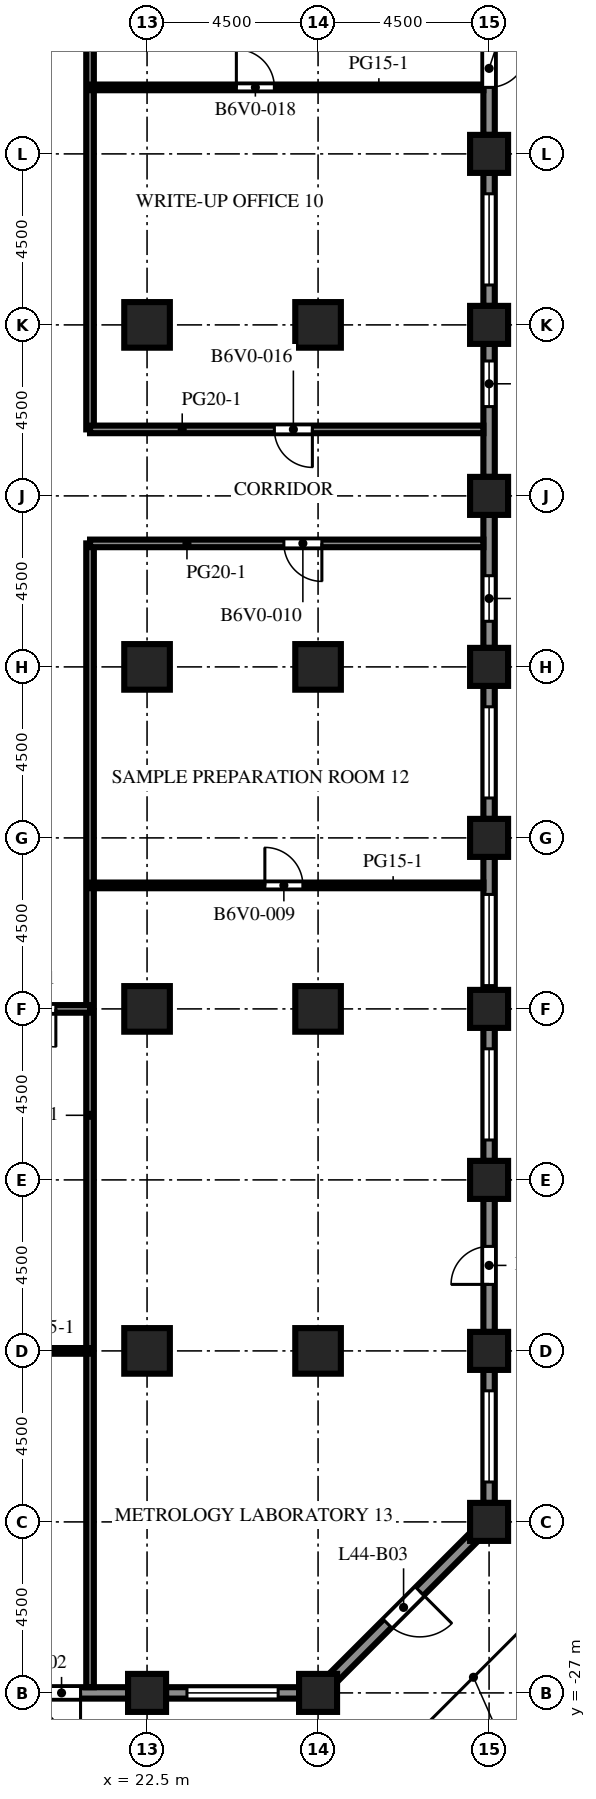
"""IFC4 building model, lengths in metres.
Left out: names, types, materials, properties, quantities, classifications, styles, units other than length and angle.
Written with IfcOpenShell. Run it as: python <this file> out.ifc"""

import sys

from ifc_helpers import new_model, si_unit, direction, frame, frame_2d, origin, origin_2d, place, context, subcontext, project, spatial, rectangle, extrude, element, fill, save


model = new_model("IFC4")
c1 = context("Model", 3, precision=1e-05, world=origin(), true_north=direction((0.0, 1.0)))
c2 = subcontext(c1, "Body", "Model", "MODEL_VIEW")
j1 = project(units=[si_unit("LENGTHUNIT", "METRE"), si_unit("PLANEANGLEUNIT", "RADIAN")], contexts=[c1])
p1 = place(None, origin())
s1 = spatial("IfcSite", under=j1, at=p1, CompositionType="ELEMENT")
p2 = place(p1, origin())
s2 = spatial("IfcBuilding", under=s1, at=p2, CompositionType="ELEMENT")
p3 = place(p2, frame((0.0, 0.0, 195.6)))
s3 = spatial("IfcBuildingStorey", under=s2, at=p3, CompositionType="ELEMENT", Elevation=195.6)
for number, where, z_axis, x_axis in (
    (1, (22.5, -27.0, 0.0), (0.0, 0.0, 1.0), (1.0, 0.0, 0.0)),
    (2, (27.0, -27.0, 0.0), (0.0, 0.0, 1.0), (1.0, 0.0, 0.0)),
    (3, (31.5, -22.5, 0.0), (0.0, 0.0, 1.0), (1.0, 0.0, 0.0)),
    (4, (31.5, -18.0, 0.0), (0.0, 0.0, 1.0), (1.0, 0.0, 0.0)),
    (5, (31.5, -13.5, 0.0), (0.0, 0.0, 1.0), (1.0, 0.0, 0.0)),
    (6, (31.5, -9.0, 0.0), (0.0, 0.0, 1.0), (1.0, 0.0, 0.0)),
    (7, (31.5, -4.5, 0.0), (0.0, 0.0, 1.0), (1.0, 0.0, 0.0)),
    (8, (31.5, 0.0, 0.0), (0.0, 0.0, 1.0), (1.0, 0.0, 0.0)),
    (9, (31.5, 4.5, 0.0), (0.0, 0.0, 1.0), (1.0, 0.0, 0.0)),
    (10, (31.5, 9.0, 0.0), (0.0, 0.0, 1.0), (1.0, 0.0, 0.0)),
    (11, (31.5, 13.5, 0.0), (0.0, 0.0, 1.0), (1.0, 0.0, 0.0)),
):
    element("IfcColumn", number, at=place(p3, frame(where, z_axis=z_axis, x_axis=x_axis)), inside=s3, PredefinedType="COLUMN", context=c2, shape_type="SweptSolid", body=[
        extrude(rectangle(XDim=1.0, YDim=1.0, at=origin_2d()), origin(), (0.0, 0.0, 1.0), 4.1),
    ])
for number, where, z_axis, x_axis in (
    (12, (22.5, -18.0, 0.0), (0.0, 0.0, 1.0), (1.0, 0.0, 0.0)),
    (13, (22.5, -9.0, 0.0), (0.0, 0.0, 1.0), (1.0, 0.0, 0.0)),
    (14, (22.5, 0.0, 0.0), (0.0, 0.0, 1.0), (1.0, 0.0, 0.0)),
    (15, (22.5, 9.0, 0.0), (0.0, 0.0, 1.0), (1.0, 0.0, 0.0)),
    (16, (27.0, -18.0, 0.0), (0.0, 0.0, 1.0), (1.0, 0.0, 0.0)),
    (17, (27.0, -9.0, 0.0), (0.0, 0.0, 1.0), (1.0, 0.0, 0.0)),
    (18, (27.0, 0.0, 0.0), (0.0, 0.0, 1.0), (1.0, 0.0, 0.0)),
    (19, (27.0, 9.0, 0.0), (0.0, 0.0, 1.0), (1.0, 0.0, 0.0)),
):
    element("IfcColumn", number, at=place(p3, frame(where, z_axis=z_axis, x_axis=x_axis)), inside=s3, PredefinedType="COLUMN", context=c2, shape_type="SweptSolid", body=[
        extrude(rectangle(XDim=1.2, YDim=1.2, at=origin_2d()), origin(), (0.0, 0.0, 1.0), 4.1),
    ])
p4 = place(p3, frame((22.0, -27.0, 0.0), z_axis=(0.0, 0.0, 1.0), x_axis=(-1.0, 0.0, 0.0)))
e20 = element("IfcWall", 20, at=p4, inside=s3, PredefinedType="SOLIDWALL", context=c2, shape_type="SweptSolid", body=[
    extrude(rectangle(XDim=3.5, YDim=0.3, at=frame_2d((1.75, 0.0))), origin(), (0.0, 0.0, 1.0), 2.85),
])
p5 = place(p4, frame((1.25, 0.0, 0.0)))
e21 = element("IfcOpeningElement", 21, at=p5, cuts=e20, PredefinedType="OPENING", context=c2, shape_type="SweptSolid", body=[
    extrude(rectangle(XDim=1.0, YDim=2.2, at=frame_2d((0.5, 1.1))), frame((0.0, 0.16, 0.0), z_axis=(0.0, -1.0, 0.0), x_axis=(1.0, 0.0, 0.0)), (0.0, 0.0, 1.0), 0.32),
])
p6 = place(p3, frame((26.5, -27.0, 0.0), z_axis=(0.0, 0.0, 1.0), x_axis=(-1.0, 0.0, 0.0)))
e22 = element("IfcWall", 22, at=p6, inside=s3, PredefinedType="SOLIDWALL", context=c2, shape_type="SweptSolid", body=[
    extrude(rectangle(XDim=3.5, YDim=0.3, at=frame_2d((1.75, 0.0))), origin(), (0.0, 0.0, 1.0), 2.85),
])
p7 = place(p6, frame((0.55, 0.0, 0.8)))
e23 = element("IfcOpeningElement", 23, at=p7, cuts=e22, PredefinedType="OPENING", context=c2, shape_type="SweptSolid", body=[
    extrude(rectangle(XDim=2.4, YDim=1.7, at=frame_2d((1.2, 0.85))), frame((0.0, 0.16, 0.0), z_axis=(0.0, -1.0, 0.0), x_axis=(1.0, 0.0, 0.0)), (0.0, 0.0, 1.0), 0.32),
])
p8 = place(p3, frame((31.106, -22.894, 0.0), z_axis=(0.0, 0.0, 1.0), x_axis=(-0.707106781187, -0.707106781187, 0.0)))
e24 = element("IfcWall", 24, at=p8, inside=s3, PredefinedType="SOLIDWALL", context=c2, shape_type="SweptSolid", body=[
    extrude(rectangle(XDim=5.25, YDim=0.3, at=frame_2d((2.625, 0.0))), origin(), (0.0, 0.0, 1.0), 2.85),
])
p9 = place(p8, frame((2.025, 0.0, 0.0)))
e25 = element("IfcOpeningElement", 25, at=p9, cuts=e24, PredefinedType="OPENING", context=c2, shape_type="SweptSolid", body=[
    extrude(rectangle(XDim=1.2, YDim=2.2, at=frame_2d((0.6, 1.1))), frame((0.0, 0.16, 0.0), z_axis=(0.0, -1.0, 0.0), x_axis=(1.0, 0.0, 0.0)), (0.0, 0.0, 1.0), 0.32),
])
p10 = place(p3, frame((31.5, -18.5, 0.0), z_axis=(0.0, 0.0, 1.0), x_axis=(0.0, -1.0, 0.0)))
e26 = element("IfcWall", 26, at=p10, inside=s3, PredefinedType="SOLIDWALL", context=c2, shape_type="SweptSolid", body=[
    extrude(rectangle(XDim=3.5, YDim=0.3, at=frame_2d((1.75, 0.0))), origin(), (0.0, 0.0, 1.0), 2.85),
])
p11 = place(p10, frame((0.55, 0.0, 0.8)))
e27 = element("IfcOpeningElement", 27, at=p11, cuts=e26, PredefinedType="OPENING", context=c2, shape_type="SweptSolid", body=[
    extrude(rectangle(XDim=2.4, YDim=1.7, at=frame_2d((1.2, 0.85))), frame((0.0, 0.16, 0.0), z_axis=(0.0, -1.0, 0.0), x_axis=(1.0, 0.0, 0.0)), (0.0, 0.0, 1.0), 0.32),
])
p12 = place(p3, frame((31.5, -14.0, 0.0), z_axis=(0.0, 0.0, 1.0), x_axis=(0.0, -1.0, 0.0)))
e28 = element("IfcWall", 28, at=p12, inside=s3, PredefinedType="SOLIDWALL", context=c2, shape_type="SweptSolid", body=[
    extrude(rectangle(XDim=3.5, YDim=0.3, at=frame_2d((1.75, 0.0))), origin(), (0.0, 0.0, 1.0), 2.85),
])
p13 = place(p12, frame((1.25, 0.0, 0.0)))
e29 = element("IfcOpeningElement", 29, at=p13, cuts=e28, PredefinedType="OPENING", context=c2, shape_type="SweptSolid", body=[
    extrude(rectangle(XDim=1.0, YDim=2.2, at=frame_2d((0.5, 1.1))), frame((0.0, 0.16, 0.0), z_axis=(0.0, -1.0, 0.0), x_axis=(1.0, 0.0, 0.0)), (0.0, 0.0, 1.0), 0.32),
])
p14 = place(p3, frame((31.5, -9.5, 0.0), z_axis=(0.0, 0.0, 1.0), x_axis=(0.0, -1.0, 0.0)))
e30 = element("IfcWall", 30, at=p14, inside=s3, PredefinedType="SOLIDWALL", context=c2, shape_type="SweptSolid", body=[
    extrude(rectangle(XDim=3.5, YDim=0.3, at=frame_2d((1.75, 0.0))), origin(), (0.0, 0.0, 1.0), 2.85),
])
p15 = place(p14, frame((0.55, 0.0, 0.8)))
e31 = element("IfcOpeningElement", 31, at=p15, cuts=e30, PredefinedType="OPENING", context=c2, shape_type="SweptSolid", body=[
    extrude(rectangle(XDim=2.4, YDim=1.7, at=frame_2d((1.2, 0.85))), frame((0.0, 0.16, 0.0), z_axis=(0.0, -1.0, 0.0), x_axis=(1.0, 0.0, 0.0)), (0.0, 0.0, 1.0), 0.32),
])
p16 = place(p3, frame((31.5, -5.0, 0.0), z_axis=(0.0, 0.0, 1.0), x_axis=(0.0, -1.0, 0.0)))
e32 = element("IfcWall", 32, at=p16, inside=s3, PredefinedType="SOLIDWALL", context=c2, shape_type="SweptSolid", body=[
    extrude(rectangle(XDim=3.5, YDim=0.3, at=frame_2d((1.75, 0.0))), origin(), (0.0, 0.0, 1.0), 2.85),
])
p17 = place(p16, frame((0.988, 0.0, 0.8)))
e33 = element("IfcOpeningElement", 33, at=p17, cuts=e32, PredefinedType="OPENING", context=c2, shape_type="SweptSolid", body=[
    extrude(rectangle(XDim=2.4, YDim=1.7, at=frame_2d((1.2, 0.85))), frame((0.0, 0.16, 0.0), z_axis=(0.0, -1.0, 0.0), x_axis=(1.0, 0.0, 0.0)), (0.0, 0.0, 1.0), 0.32),
])
p18 = place(p3, frame((31.5, -0.5, 0.0), z_axis=(0.0, 0.0, 1.0), x_axis=(0.0, -1.0, 0.0)))
e34 = element("IfcWall", 34, at=p18, inside=s3, PredefinedType="SOLIDWALL", context=c2, shape_type="SweptSolid", body=[
    extrude(rectangle(XDim=3.5, YDim=0.3, at=frame_2d((1.75, 0.0))), origin(), (0.0, 0.0, 1.0), 2.85),
])
p19 = place(p18, frame((0.55, 0.0, 0.8)))
e35 = element("IfcOpeningElement", 35, at=p19, cuts=e34, PredefinedType="OPENING", context=c2, shape_type="SweptSolid", body=[
    extrude(rectangle(XDim=2.4, YDim=1.7, at=frame_2d((1.2, 0.85))), frame((0.0, 0.16, 0.0), z_axis=(0.0, -1.0, 0.0), x_axis=(1.0, 0.0, 0.0)), (0.0, 0.0, 1.0), 0.32),
])
p20 = place(p3, frame((31.5, 4.0, 0.0), z_axis=(0.0, 0.0, 1.0), x_axis=(0.0, -1.0, 0.0)))
e36 = element("IfcWall", 36, at=p20, inside=s3, PredefinedType="SOLIDWALL", context=c2, shape_type="SweptSolid", body=[
    extrude(rectangle(XDim=3.5, YDim=0.3, at=frame_2d((1.75, 0.0))), origin(), (0.0, 0.0, 1.0), 2.85),
])
p21 = place(p20, frame((1.6, 0.0, 0.8)))
e37 = element("IfcOpeningElement", 37, at=p21, cuts=e36, PredefinedType="OPENING", context=c2, shape_type="SweptSolid", body=[
    extrude(rectangle(XDim=1.2, YDim=1.7, at=frame_2d((0.6, 0.85))), frame((0.0, 0.16, 0.0), z_axis=(0.0, -1.0, 0.0), x_axis=(1.0, 0.0, 0.0)), (0.0, 0.0, 1.0), 0.32),
])
p22 = place(p3, frame((31.5, 8.5, 0.0), z_axis=(0.0, 0.0, 1.0), x_axis=(0.0, -1.0, 0.0)))
e38 = element("IfcWall", 38, at=p22, inside=s3, PredefinedType="SOLIDWALL", context=c2, shape_type="SweptSolid", body=[
    extrude(rectangle(XDim=3.5, YDim=0.3, at=frame_2d((1.75, 0.0))), origin(), (0.0, 0.0, 1.0), 2.85),
])
p23 = place(p22, frame((0.45, 0.0, 0.8)))
e39 = element("IfcOpeningElement", 39, at=p23, cuts=e38, PredefinedType="OPENING", context=c2, shape_type="SweptSolid", body=[
    extrude(rectangle(XDim=1.2, YDim=1.7, at=frame_2d((0.6, 0.85))), frame((0.0, 0.16, 0.0), z_axis=(0.0, -1.0, 0.0), x_axis=(1.0, 0.0, 0.0)), (0.0, 0.0, 1.0), 0.32),
])
p24 = place(p3, frame((31.5, 13.0, 0.0), z_axis=(0.0, 0.0, 1.0), x_axis=(0.0, -1.0, 0.0)))
e40 = element("IfcWall", 40, at=p24, inside=s3, PredefinedType="SOLIDWALL", context=c2, shape_type="SweptSolid", body=[
    extrude(rectangle(XDim=3.5, YDim=0.3, at=frame_2d((1.75, 0.0))), origin(), (0.0, 0.0, 1.0), 2.85),
])
p25 = place(p24, frame((0.55, 0.0, 0.8)))
e41 = element("IfcOpeningElement", 41, at=p25, cuts=e40, PredefinedType="OPENING", context=c2, shape_type="SweptSolid", body=[
    extrude(rectangle(XDim=2.4, YDim=1.7, at=frame_2d((1.2, 0.85))), frame((0.0, 0.16, 0.0), z_axis=(0.0, -1.0, 0.0), x_axis=(1.0, 0.0, 0.0)), (0.0, 0.0, 1.0), 0.32),
])
p26 = place(p3, frame((31.5, 17.5, 0.0), z_axis=(0.0, 0.0, 1.0), x_axis=(0.0, -1.0, 0.0)))
e42 = element("IfcWall", 42, at=p26, inside=s3, PredefinedType="SOLIDWALL", context=c2, shape_type="SweptSolid", body=[
    extrude(rectangle(XDim=3.5, YDim=0.3, at=frame_2d((1.75, 0.0))), origin(), (0.0, 0.0, 1.0), 2.85),
])
p27 = place(p26, frame((1.25, 0.0, 0.0)))
e43 = element("IfcOpeningElement", 43, at=p27, cuts=e42, PredefinedType="OPENING", context=c2, shape_type="SweptSolid", body=[
    extrude(rectangle(XDim=1.0, YDim=2.2, at=frame_2d((0.5, 1.1))), frame((0.0, 0.16, 0.0), z_axis=(0.0, -1.0, 0.0), x_axis=(1.0, 0.0, 0.0)), (0.0, 0.0, 1.0), 0.32),
])
p28 = place(p3, frame((21.0, -26.85, 0.0), z_axis=(0.0, 0.0, 1.0), x_axis=(0.0, 1.0, 0.0)))
e44 = element("IfcWall", 44, at=p28, inside=s3, PredefinedType="PARTITIONING", context=c2, shape_type="SweptSolid", body=[
    extrude(rectangle(XDim=30.1, YDim=0.2, at=frame_2d((15.05, 0.0))), origin(), (0.0, 0.0, 1.0), 3.65),
])
p29 = place(p3, frame((21.0, 6.25, 0.0), z_axis=(0.0, 0.0, 1.0), x_axis=(0.0, 1.0, 0.0)))
e45 = element("IfcWall", 45, at=p29, inside=s3, PredefinedType="PARTITIONING", context=c2, shape_type="SweptSolid", body=[
    extrude(rectangle(XDim=20.6, YDim=0.2, at=frame_2d((10.3, 0.0))), origin(), (0.0, 0.0, 1.0), 3.65),
])
p30 = place(p3, frame((18.6, -18.0, 0.0), z_axis=(0.0, 0.0, 1.0), x_axis=(1.0, 0.0, 0.0)))
e46 = element("IfcWall", 46, at=p30, inside=s3, PredefinedType="PARTITIONING", context=c2, shape_type="SweptSolid", body=[
    extrude(rectangle(XDim=2.4, YDim=0.15, at=frame_2d((1.2, 0.0))), origin(), (0.0, 0.0, 1.0), 3.65),
])
p31 = place(p3, frame((21.0, -9.0, 0.0), z_axis=(0.0, 0.0, 1.0), x_axis=(-1.0, 0.0, 0.0)))
e47 = element("IfcWall", 47, at=p31, inside=s3, PredefinedType="PARTITIONING", context=c2, shape_type="SweptSolid", body=[
    extrude(rectangle(XDim=3.0, YDim=0.2, at=frame_2d((1.5, 0.0))), origin(), (0.0, 0.0, 1.0), 3.65),
])
p32 = place(p31, frame((0.9, 0.0, 0.0)))
e48 = element("IfcOpeningElement", 48, at=p32, cuts=e47, PredefinedType="OPENING", context=c2, shape_type="SweptSolid", body=[
    extrude(rectangle(XDim=1.0, YDim=2.1, at=frame_2d((0.5, 1.05))), frame((0.0, 0.11, 0.0), z_axis=(0.0, -1.0, 0.0), x_axis=(1.0, 0.0, 0.0)), (0.0, 0.0, 1.0), 0.22),
])
p33 = place(p3, frame((31.35, -5.75, 0.0), z_axis=(0.0, 0.0, 1.0), x_axis=(-1.0, 0.0, 0.0)))
e49 = element("IfcWall", 49, at=p33, inside=s3, PredefinedType="PARTITIONING", context=c2, shape_type="SweptSolid", body=[
    extrude(rectangle(XDim=10.35, YDim=0.15, at=frame_2d((5.175, 0.0))), origin(), (0.0, 0.0, 1.0), 3.65),
])
p34 = place(p33, frame((4.75, 0.0, 0.0)))
e50 = element("IfcOpeningElement", 50, at=p34, cuts=e49, PredefinedType="OPENING", context=c2, shape_type="SweptSolid", body=[
    extrude(rectangle(XDim=1.0, YDim=2.1, at=frame_2d((0.5, 1.05))), frame((0.0, 0.085, 0.0), z_axis=(0.0, -1.0, 0.0), x_axis=(1.0, 0.0, 0.0)), (0.0, 0.0, 1.0), 0.17),
])
p35 = place(p3, frame((31.35, 3.25, 0.0), z_axis=(0.0, 0.0, 1.0), x_axis=(-1.0, 0.0, 0.0)))
e51 = element("IfcWall", 51, at=p35, inside=s3, PredefinedType="PARTITIONING", context=c2, shape_type="SweptSolid", body=[
    extrude(rectangle(XDim=10.35, YDim=0.2, at=frame_2d((5.175, 0.0))), origin(), (0.0, 0.0, 1.0), 3.65),
])
p36 = place(p35, frame((4.25, 0.0, 0.0)))
e52 = element("IfcOpeningElement", 52, at=p36, cuts=e51, PredefinedType="OPENING", context=c2, shape_type="SweptSolid", body=[
    extrude(rectangle(XDim=1.0, YDim=2.1, at=frame_2d((0.5, 1.05))), frame((0.0, 0.11, 0.0), z_axis=(0.0, -1.0, 0.0), x_axis=(1.0, 0.0, 0.0)), (0.0, 0.0, 1.0), 0.22),
])
p37 = place(p3, frame((21.0, 6.25, 0.0), z_axis=(0.0, 0.0, 1.0), x_axis=(1.0, 0.0, 0.0)))
e53 = element("IfcWall", 53, at=p37, inside=s3, PredefinedType="PARTITIONING", context=c2, shape_type="SweptSolid", body=[
    extrude(rectangle(XDim=10.35, YDim=0.2, at=frame_2d((5.175, 0.0))), origin(), (0.0, 0.0, 1.0), 3.65),
])
p38 = place(p37, frame((4.85, 0.0, 0.0)))
e54 = element("IfcOpeningElement", 54, at=p38, cuts=e53, PredefinedType="OPENING", context=c2, shape_type="SweptSolid", body=[
    extrude(rectangle(XDim=1.0, YDim=2.1, at=frame_2d((0.5, 1.05))), frame((0.0, 0.11, 0.0), z_axis=(0.0, -1.0, 0.0), x_axis=(1.0, 0.0, 0.0)), (0.0, 0.0, 1.0), 0.22),
])
p39 = place(p3, frame((21.0, 15.25, 0.0), z_axis=(0.0, 0.0, 1.0), x_axis=(1.0, 0.0, 0.0)))
e55 = element("IfcWall", 55, at=p39, inside=s3, PredefinedType="PARTITIONING", context=c2, shape_type="SweptSolid", body=[
    extrude(rectangle(XDim=10.35, YDim=0.15, at=frame_2d((5.175, 0.0))), origin(), (0.0, 0.0, 1.0), 3.65),
])
p40 = place(p39, frame((3.85, 0.0, 0.0)))
e56 = element("IfcOpeningElement", 56, at=p40, cuts=e55, PredefinedType="OPENING", context=c2, shape_type="SweptSolid", body=[
    extrude(rectangle(XDim=1.0, YDim=2.1, at=frame_2d((0.5, 1.05))), frame((0.0, 0.085, 0.0), z_axis=(0.0, -1.0, 0.0), x_axis=(1.0, 0.0, 0.0)), (0.0, 0.0, 1.0), 0.17),
])
p41 = place(p5, origin())
e57 = element("IfcDoor", 57, at=p41, inside=s3, OperationType="SINGLE_SWING_LEFT", PredefinedType="DOOR", context=c2, shape_type="SweptSolid", body=[
    extrude(rectangle(XDim=1.0, YDim=2.2, at=frame_2d((0.5, 1.1))), frame((0.0, 0.025, 0.0), z_axis=(0.0, -1.0, 0.0), x_axis=(1.0, 0.0, 0.0)), (0.0, 0.0, 1.0), 0.05),
])
fill(e21, e57)
p42 = place(p7, origin())
e58 = element("IfcWindow", 58, at=p42, inside=s3, PartitioningType="SINGLE_PANEL", PredefinedType="WINDOW", context=c2, shape_type="SweptSolid", body=[
    extrude(rectangle(XDim=2.4, YDim=1.7, at=frame_2d((1.2, 0.85))), frame((0.0, 0.03, 0.0), z_axis=(0.0, -1.0, 0.0), x_axis=(1.0, 0.0, 0.0)), (0.0, 0.0, 1.0), 0.06),
])
fill(e23, e58)
p43 = place(p9, origin())
e59 = element("IfcDoor", 59, at=p43, inside=s3, OperationType="SINGLE_SWING_LEFT", PredefinedType="DOOR", context=c2, shape_type="SweptSolid", body=[
    extrude(rectangle(XDim=1.2, YDim=2.2, at=frame_2d((0.6, 1.1))), frame((0.0, 0.025, 0.0), z_axis=(0.0, -1.0, 0.0), x_axis=(1.0, 0.0, 0.0)), (0.0, 0.0, 1.0), 0.05),
])
fill(e25, e59)
p44 = place(p11, origin())
e60 = element("IfcWindow", 60, at=p44, inside=s3, PartitioningType="SINGLE_PANEL", PredefinedType="WINDOW", context=c2, shape_type="SweptSolid", body=[
    extrude(rectangle(XDim=2.4, YDim=1.7, at=frame_2d((1.2, 0.85))), frame((0.0, 0.03, 0.0), z_axis=(0.0, -1.0, 0.0), x_axis=(1.0, 0.0, 0.0)), (0.0, 0.0, 1.0), 0.06),
])
fill(e27, e60)
p45 = place(p13, origin())
e61 = element("IfcDoor", 61, at=p45, inside=s3, OperationType="SINGLE_SWING_RIGHT", PredefinedType="DOOR", context=c2, shape_type="SweptSolid", body=[
    extrude(rectangle(XDim=1.0, YDim=2.2, at=frame_2d((0.5, 1.1))), frame((0.0, 0.025, 0.0), z_axis=(0.0, -1.0, 0.0), x_axis=(1.0, 0.0, 0.0)), (0.0, 0.0, 1.0), 0.05),
])
fill(e29, e61)
p46 = place(p15, origin())
e62 = element("IfcWindow", 62, at=p46, inside=s3, PartitioningType="SINGLE_PANEL", PredefinedType="WINDOW", context=c2, shape_type="SweptSolid", body=[
    extrude(rectangle(XDim=2.4, YDim=1.7, at=frame_2d((1.2, 0.85))), frame((0.0, 0.03, 0.0), z_axis=(0.0, -1.0, 0.0), x_axis=(1.0, 0.0, 0.0)), (0.0, 0.0, 1.0), 0.06),
])
fill(e31, e62)
p47 = place(p17, origin())
e63 = element("IfcWindow", 63, at=p47, inside=s3, PartitioningType="SINGLE_PANEL", PredefinedType="WINDOW", context=c2, shape_type="SweptSolid", body=[
    extrude(rectangle(XDim=2.4, YDim=1.7, at=frame_2d((1.2, 0.85))), frame((0.0, 0.03, 0.0), z_axis=(0.0, -1.0, 0.0), x_axis=(1.0, 0.0, 0.0)), (0.0, 0.0, 1.0), 0.06),
])
fill(e33, e63)
p48 = place(p19, origin())
e64 = element("IfcWindow", 64, at=p48, inside=s3, PartitioningType="SINGLE_PANEL", PredefinedType="WINDOW", context=c2, shape_type="SweptSolid", body=[
    extrude(rectangle(XDim=2.4, YDim=1.7, at=frame_2d((1.2, 0.85))), frame((0.0, 0.03, 0.0), z_axis=(0.0, -1.0, 0.0), x_axis=(1.0, 0.0, 0.0)), (0.0, 0.0, 1.0), 0.06),
])
fill(e35, e64)
p49 = place(p21, origin())
e65 = element("IfcWindow", 65, at=p49, inside=s3, PartitioningType="SINGLE_PANEL", PredefinedType="WINDOW", context=c2, shape_type="SweptSolid", body=[
    extrude(rectangle(XDim=1.2, YDim=1.7, at=frame_2d((0.6, 0.85))), frame((0.0, 0.03, 0.0), z_axis=(0.0, -1.0, 0.0), x_axis=(1.0, 0.0, 0.0)), (0.0, 0.0, 1.0), 0.06),
])
fill(e37, e65)
p50 = place(p23, origin())
e66 = element("IfcWindow", 66, at=p50, inside=s3, PartitioningType="SINGLE_PANEL", PredefinedType="WINDOW", context=c2, shape_type="SweptSolid", body=[
    extrude(rectangle(XDim=1.2, YDim=1.7, at=frame_2d((0.6, 0.85))), frame((0.0, 0.03, 0.0), z_axis=(0.0, -1.0, 0.0), x_axis=(1.0, 0.0, 0.0)), (0.0, 0.0, 1.0), 0.06),
])
fill(e39, e66)
p51 = place(p25, origin())
e67 = element("IfcWindow", 67, at=p51, inside=s3, PartitioningType="SINGLE_PANEL", PredefinedType="WINDOW", context=c2, shape_type="SweptSolid", body=[
    extrude(rectangle(XDim=2.4, YDim=1.7, at=frame_2d((1.2, 0.85))), frame((0.0, 0.03, 0.0), z_axis=(0.0, -1.0, 0.0), x_axis=(1.0, 0.0, 0.0)), (0.0, 0.0, 1.0), 0.06),
])
fill(e41, e67)
p52 = place(p27, origin())
e68 = element("IfcDoor", 68, at=p52, inside=s3, OperationType="SINGLE_SWING_LEFT", PredefinedType="DOOR", context=c2, shape_type="SweptSolid", body=[
    extrude(rectangle(XDim=1.0, YDim=2.2, at=frame_2d((0.5, 1.1))), frame((0.0, 0.025, 0.0), z_axis=(0.0, -1.0, 0.0), x_axis=(1.0, 0.0, 0.0)), (0.0, 0.0, 1.0), 0.05),
])
fill(e43, e68)
p53 = place(p32, origin())
e69 = element("IfcDoor", 69, at=p53, inside=s3, OperationType="SINGLE_SWING_LEFT", PredefinedType="DOOR", context=c2, shape_type="SweptSolid", body=[
    extrude(rectangle(XDim=1.0, YDim=2.1, at=frame_2d((0.5, 1.05))), frame((0.0, 0.025, 0.0), z_axis=(0.0, -1.0, 0.0), x_axis=(1.0, 0.0, 0.0)), (0.0, 0.0, 1.0), 0.05),
])
fill(e48, e69)
p54 = place(p34, origin())
e70 = element("IfcDoor", 70, at=p54, inside=s3, OperationType="SINGLE_SWING_RIGHT", PredefinedType="DOOR", context=c2, shape_type="SweptSolid", body=[
    extrude(rectangle(XDim=1.0, YDim=2.1, at=frame_2d((0.5, 1.05))), frame((0.0, 0.025, 0.0), z_axis=(0.0, -1.0, 0.0), x_axis=(1.0, 0.0, 0.0)), (0.0, 0.0, 1.0), 0.05),
])
fill(e50, e70)
p55 = place(p36, origin())
e71 = element("IfcDoor", 71, at=p55, inside=s3, OperationType="SINGLE_SWING_LEFT", PredefinedType="DOOR", context=c2, shape_type="SweptSolid", body=[
    extrude(rectangle(XDim=1.0, YDim=2.1, at=frame_2d((0.5, 1.05))), frame((0.0, 0.025, 0.0), z_axis=(0.0, -1.0, 0.0), x_axis=(1.0, 0.0, 0.0)), (0.0, 0.0, 1.0), 0.05),
])
fill(e52, e71)
p56 = place(p38, origin())
e72 = element("IfcDoor", 72, at=p56, inside=s3, OperationType="SINGLE_SWING_RIGHT", PredefinedType="DOOR", context=c2, shape_type="SweptSolid", body=[
    extrude(rectangle(XDim=1.0, YDim=2.1, at=frame_2d((0.5, 1.05))), frame((0.0, 0.025, 0.0), z_axis=(0.0, -1.0, 0.0), x_axis=(1.0, 0.0, 0.0)), (0.0, 0.0, 1.0), 0.05),
])
fill(e54, e72)
p57 = place(p40, origin())
e73 = element("IfcDoor", 73, at=p57, inside=s3, OperationType="SINGLE_SWING_LEFT", PredefinedType="DOOR", context=c2, shape_type="SweptSolid", body=[
    extrude(rectangle(XDim=1.0, YDim=2.1, at=frame_2d((0.5, 1.05))), frame((0.0, 0.025, 0.0), z_axis=(0.0, -1.0, 0.0), x_axis=(1.0, 0.0, 0.0)), (0.0, 0.0, 1.0), 0.05),
])
fill(e56, e73)
save(model, sys.argv[1])
